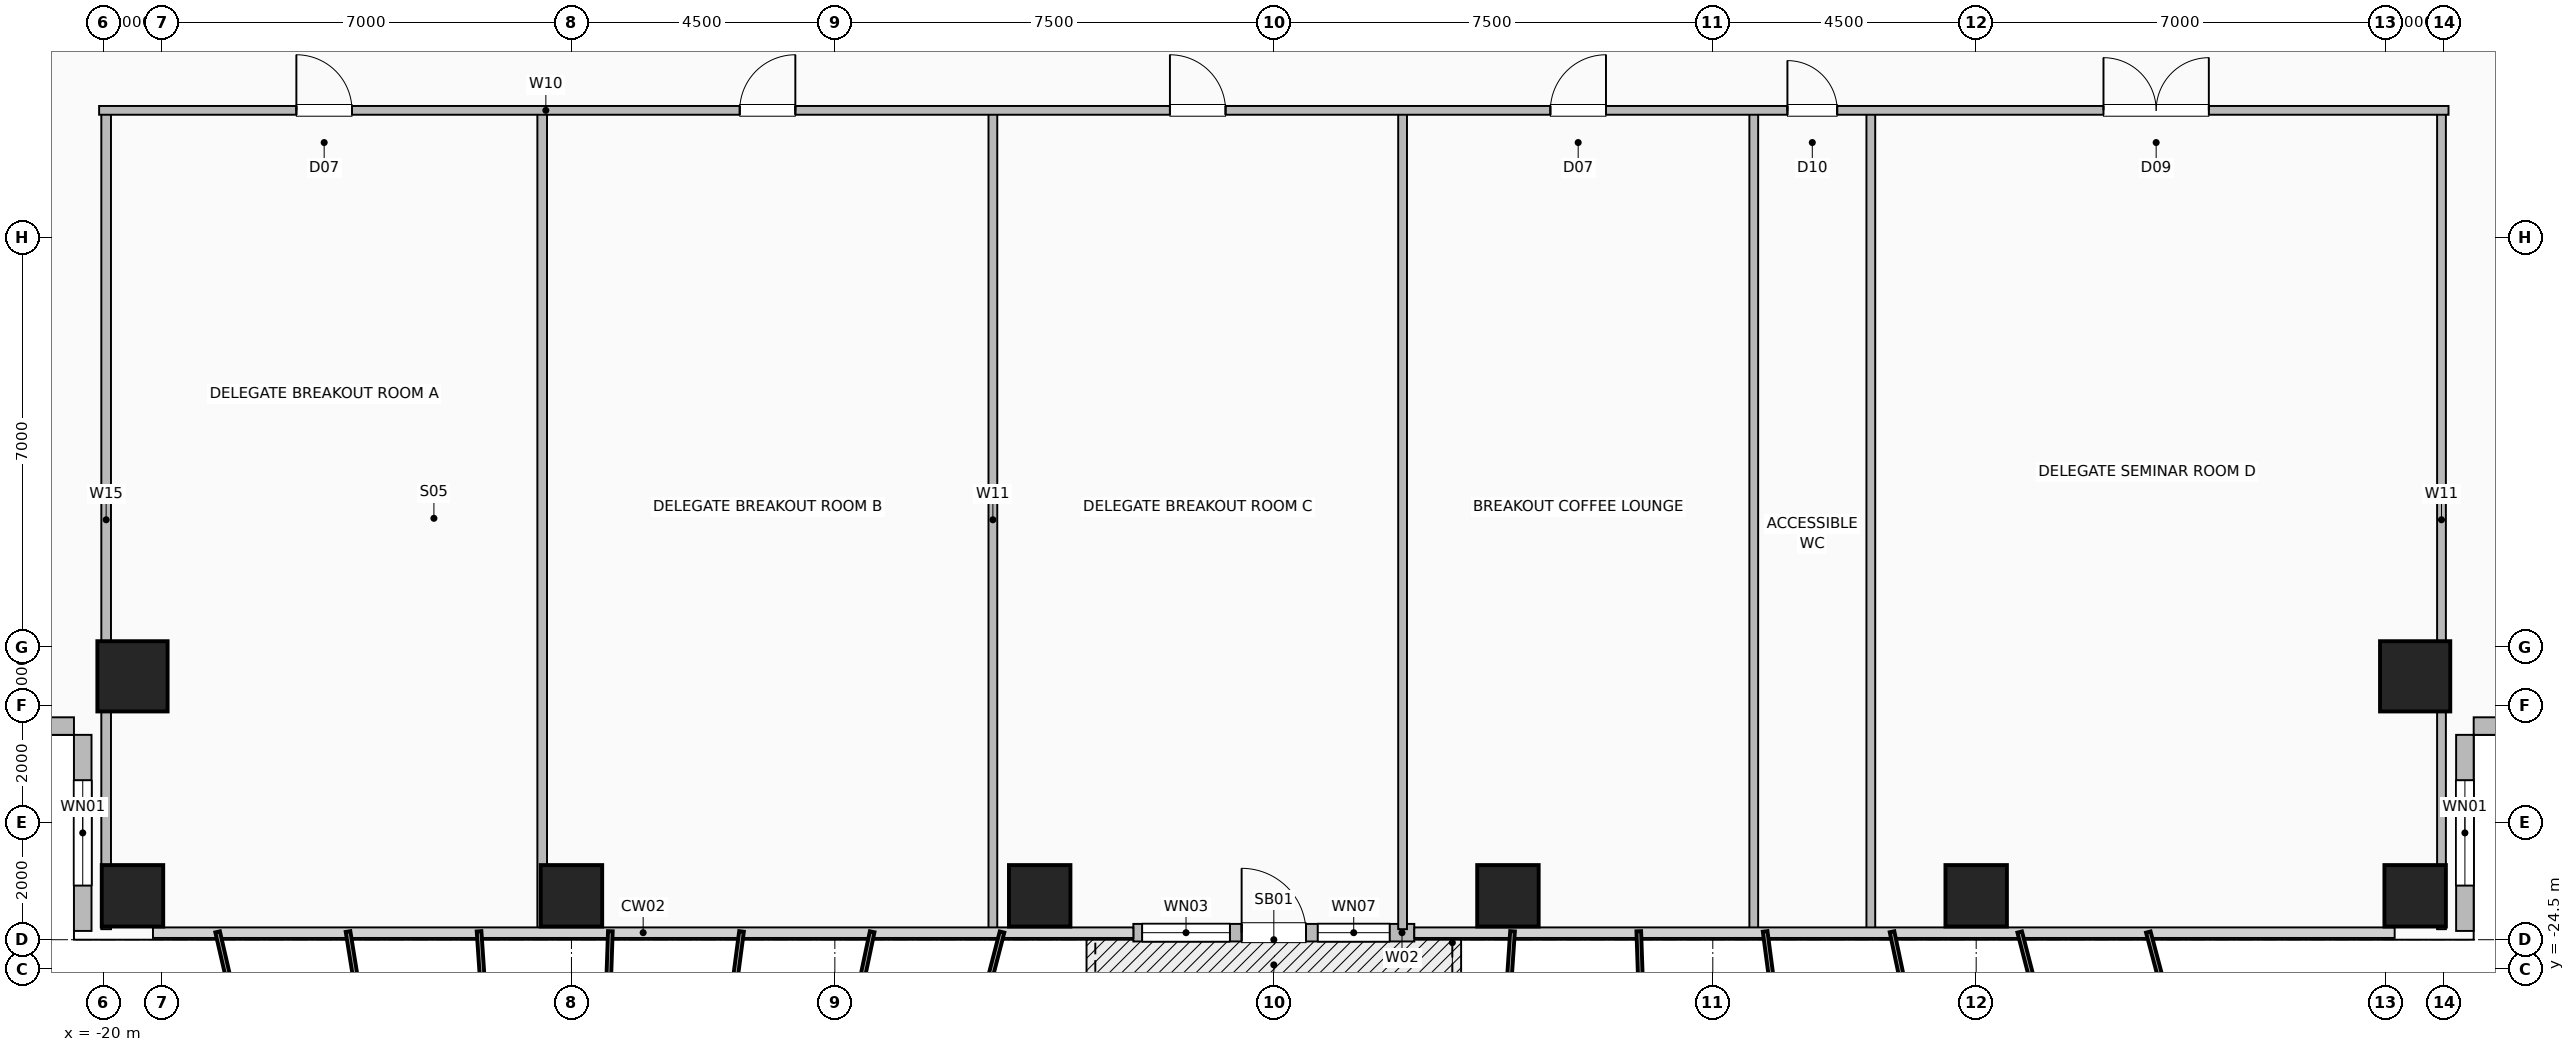
"""IFC4 building model, lengths in metres.
Left out: names, types, materials, properties, quantities, classifications, styles, units other than length and angle.
Written with IfcOpenShell. Run it as: python <this file> out.ifc"""

import sys

from ifc_helpers import new_model, si_unit, direction, frame, frame_2d, origin, origin_2d, place, context, subcontext, project, spatial, rectangle, hollow_rectangle, extrude, element, fill, save


model = new_model("IFC4")
c1 = context("Model", 3, precision=1e-05, world=origin(), true_north=direction((0.0, 1.0)))
c2 = subcontext(c1, "Body", "Model", "MODEL_VIEW")
j1 = project(units=[si_unit("LENGTHUNIT", "METRE"), si_unit("PLANEANGLEUNIT", "RADIAN")], contexts=[c1])
p1 = place(None, origin())
s1 = spatial("IfcSite", under=j1, at=p1, CompositionType="ELEMENT")
p2 = place(p1, origin())
s2 = spatial("IfcBuilding", under=s1, at=p2, CompositionType="ELEMENT")
p3 = place(p2, frame((0.0, 0.0, 37.5)))
s3 = spatial("IfcBuildingStorey", under=s2, at=p3, CompositionType="ELEMENT", Elevation=37.5)
for number, where, z_axis, x_axis in (
    (1, (-19.5, -23.25, 0.0), (0.0, 0.0, 1.0), (1.0, 0.0, 0.0)),
    (2, (-12.0, -23.25, 0.0), (0.0, 0.0, 1.0), (1.0, 0.0, 0.0)),
    (3, (-4.0, -23.25, 0.0), (0.0, 0.0, 1.0), (1.0, 0.0, 0.0)),
    (4, (4.0, -23.25, 0.0), (0.0, 0.0, 1.0), (1.0, 0.0, 0.0)),
    (5, (12.0, -23.25, 0.0), (0.0, 0.0, 1.0), (1.0, 0.0, 0.0)),
    (6, (19.5, -23.25, 0.0), (0.0, 0.0, 1.0), (1.0, 0.0, 0.0)),
):
    element("IfcColumn", number, at=place(p3, frame(where, z_axis=z_axis, x_axis=x_axis)), inside=s3, PredefinedType="COLUMN", context=c2, shape_type="SweptSolid", body=[
        extrude(hollow_rectangle(XDim=1.05, YDim=1.05, WallThickness=0.05, at=origin_2d()), origin(), (0.0, 0.0, 1.0), 3.5),
    ])
for number, where, z_axis, x_axis in (
    (7, (-19.5, -19.5, 0.0), (0.0, 0.0, 1.0), (1.0, 0.0, 0.0)),
    (8, (19.5, -19.5, 0.0), (0.0, 0.0, 1.0), (1.0, 0.0, 0.0)),
):
    element("IfcColumn", number, at=place(p3, frame(where, z_axis=z_axis, x_axis=x_axis)), inside=s3, PredefinedType="COLUMN", context=c2, shape_type="SweptSolid", body=[
        extrude(hollow_rectangle(XDim=1.2, YDim=1.2, WallThickness=0.055, at=origin_2d()), origin(), (0.0, 0.0, 1.0), 3.5),
    ])
p4 = place(p3, frame((-2.4, -23.88, 0.0), z_axis=(0.0, 0.0, 1.0), x_axis=(1.0, 0.0, 0.0)))
e9 = element("IfcWall", 9, at=p4, inside=s3, PredefinedType="SOLIDWALL", context=c2, shape_type="SweptSolid", body=[
    extrude(rectangle(XDim=4.8, YDim=0.3, at=frame_2d((2.4, 0.0))), origin(), (0.0, 0.0, 1.0), 3.25),
])
p5 = place(p4, frame((1.85, 0.0, 0.0)))
e10 = element("IfcOpeningElement", 10, at=p5, cuts=e9, PredefinedType="OPENING", context=c2, shape_type="SweptSolid", body=[
    extrude(rectangle(XDim=1.1, YDim=2.2, at=frame_2d((0.55, 1.1))), frame((0.0, 0.16, 0.0), z_axis=(0.0, -1.0, 0.0), x_axis=(1.0, 0.0, 0.0)), (0.0, 0.0, 1.0), 0.32),
])
p6 = place(p4, frame((0.15, 0.0, 0.85)))
e11 = element("IfcOpeningElement", 11, at=p6, cuts=e9, PredefinedType="OPENING", context=c2, shape_type="SweptSolid", body=[
    extrude(rectangle(XDim=1.5, YDim=1.8, at=frame_2d((0.75, 0.9))), frame((0.0, 0.16, 0.0), z_axis=(0.0, -1.0, 0.0), x_axis=(1.0, 0.0, 0.0)), (0.0, 0.0, 1.0), 0.32),
])
p7 = place(p4, frame((3.15, 0.0, 0.85)))
e12 = element("IfcOpeningElement", 12, at=p7, cuts=e9, PredefinedType="OPENING", context=c2, shape_type="SweptSolid", body=[
    extrude(rectangle(XDim=1.23, YDim=1.8, at=frame_2d((0.615, 0.9))), frame((0.0, 0.16, 0.0), z_axis=(0.0, -1.0, 0.0), x_axis=(1.0, 0.0, 0.0)), (0.0, 0.0, 1.0), 0.32),
])
p8 = place(p3, frame((-20.35, -23.85, 0.0), z_axis=(0.0, 0.0, 1.0), x_axis=(0.0, 1.0, 0.0)))
e13 = element("IfcWall", 13, at=p8, inside=s3, PredefinedType="SOLIDWALL", context=c2, shape_type="SweptSolid", body=[
    extrude(rectangle(XDim=3.35, YDim=0.3, at=frame_2d((1.675, 0.0))), origin(), (0.0, 0.0, 1.0), 3.25),
])
p9 = place(p8, frame((0.775, 0.0, 0.9)))
e14 = element("IfcOpeningElement", 14, at=p9, cuts=e13, PredefinedType="OPENING", context=c2, shape_type="SweptSolid", body=[
    extrude(rectangle(XDim=1.8, YDim=1.8, at=frame_2d((0.9, 0.9))), frame((0.0, 0.16, 0.0), z_axis=(0.0, -1.0, 0.0), x_axis=(1.0, 0.0, 0.0)), (0.0, 0.0, 1.0), 0.32),
])
p10 = place(p3, frame((-23.85, -20.35, 0.0), z_axis=(0.0, 0.0, 1.0), x_axis=(1.0, 0.0, 0.0)))
e15 = element("IfcWall", 15, at=p10, inside=s3, PredefinedType="SOLIDWALL", context=c2, shape_type="SweptSolid", body=[
    extrude(rectangle(XDim=3.35, YDim=0.3, at=frame_2d((1.675, 0.0))), origin(), (0.0, 0.0, 1.0), 3.25),
])
p11 = place(p3, frame((20.35, -23.85, 0.0), z_axis=(0.0, 0.0, 1.0), x_axis=(0.0, 1.0, 0.0)))
e16 = element("IfcWall", 16, at=p11, inside=s3, PredefinedType="SOLIDWALL", context=c2, shape_type="SweptSolid", body=[
    extrude(rectangle(XDim=3.35, YDim=0.3, at=frame_2d((1.675, 0.0))), origin(), (0.0, 0.0, 1.0), 3.25),
])
p12 = place(p11, frame((0.775, 0.0, 0.9)))
e17 = element("IfcOpeningElement", 17, at=p12, cuts=e16, PredefinedType="OPENING", context=c2, shape_type="SweptSolid", body=[
    extrude(rectangle(XDim=1.8, YDim=1.8, at=frame_2d((0.9, 0.9))), frame((0.0, 0.16, 0.0), z_axis=(0.0, -1.0, 0.0), x_axis=(1.0, 0.0, 0.0)), (0.0, 0.0, 1.0), 0.32),
])
p13 = place(p3, frame((23.85, -20.35, 0.0), z_axis=(0.0, 0.0, 1.0), x_axis=(-1.0, 0.0, 0.0)))
e18 = element("IfcWall", 18, at=p13, inside=s3, PredefinedType="SOLIDWALL", context=c2, shape_type="SweptSolid", body=[
    extrude(rectangle(XDim=3.35, YDim=0.3, at=frame_2d((1.675, 0.0))), origin(), (0.0, 0.0, 1.0), 3.25),
])
for number, where, z_axis, x_axis in (
    (19, (-19.95, -23.82, 0.0), (0.0, 0.0, 1.0), (0.0, 1.0, 0.0)),
    (20, (-12.5, -23.82, 0.0), (0.0, 0.0, 1.0), (0.0, 1.0, 0.0)),
):
    element("IfcWall", number, at=place(p3, frame(where, z_axis=z_axis, x_axis=x_axis)), inside=s3, PredefinedType="PLUMBINGWALL", context=c2, shape_type="SweptSolid", body=[
        extrude(rectangle(XDim=13.99, YDim=0.165, at=frame_2d((6.995, 0.0))), origin(), (0.0, 0.0, 1.0), 3.25),
    ])
for number, where, z_axis, x_axis in (
    (21, (-4.8, -23.82, 0.0), (0.0, 0.0, 1.0), (0.0, 1.0, 0.0)),
    (22, (2.2, -23.82, 0.0), (0.0, 0.0, 1.0), (0.0, 1.0, 0.0)),
    (23, (8.2, -23.82, 0.0), (0.0, 0.0, 1.0), (0.0, 1.0, 0.0)),
    (24, (10.2, -23.82, 0.0), (0.0, 0.0, 1.0), (0.0, 1.0, 0.0)),
    (25, (19.95, -23.82, 0.0), (0.0, 0.0, 1.0), (0.0, 1.0, 0.0)),
):
    element("IfcWall", number, at=place(p3, frame(where, z_axis=z_axis, x_axis=x_axis)), inside=s3, PredefinedType="PARTITIONING", context=c2, shape_type="SweptSolid", body=[
        extrude(rectangle(XDim=13.99, YDim=0.15, at=frame_2d((6.995, 0.0))), origin(), (0.0, 0.0, 1.0), 3.25),
    ])
p14 = place(p3, frame((-20.07, -9.83, 0.0), z_axis=(0.0, 0.0, 1.0), x_axis=(1.0, 0.0, 0.0)))
e26 = element("IfcWall", 26, at=p14, inside=s3, PredefinedType="PARTITIONING", context=c2, shape_type="SweptSolid", body=[
    extrude(rectangle(XDim=40.14, YDim=0.15, at=frame_2d((20.07, 0.0))), origin(), (0.0, 0.0, 1.0), 3.25),
])
p15 = place(p14, frame((3.37, 0.0, 0.0)))
e27 = element("IfcOpeningElement", 27, at=p15, cuts=e26, PredefinedType="OPENING", context=c2, shape_type="SweptSolid", body=[
    extrude(rectangle(XDim=0.95, YDim=2.06, at=frame_2d((0.475, 1.03))), frame((0.0, 0.085, 0.0), z_axis=(0.0, -1.0, 0.0), x_axis=(1.0, 0.0, 0.0)), (0.0, 0.0, 1.0), 0.17),
])
p16 = place(p14, frame((10.945, 0.0, 0.0)))
e28 = element("IfcOpeningElement", 28, at=p16, cuts=e26, PredefinedType="OPENING", context=c2, shape_type="SweptSolid", body=[
    extrude(rectangle(XDim=0.95, YDim=2.06, at=frame_2d((0.475, 1.03))), frame((0.0, 0.085, 0.0), z_axis=(0.0, -1.0, 0.0), x_axis=(1.0, 0.0, 0.0)), (0.0, 0.0, 1.0), 0.17),
])
p17 = place(p14, frame((18.295, 0.0, 0.0)))
e29 = element("IfcOpeningElement", 29, at=p17, cuts=e26, PredefinedType="OPENING", context=c2, shape_type="SweptSolid", body=[
    extrude(rectangle(XDim=0.95, YDim=2.06, at=frame_2d((0.475, 1.03))), frame((0.0, 0.085, 0.0), z_axis=(0.0, -1.0, 0.0), x_axis=(1.0, 0.0, 0.0)), (0.0, 0.0, 1.0), 0.17),
])
p18 = place(p14, frame((24.795, 0.0, 0.0)))
e30 = element("IfcOpeningElement", 30, at=p18, cuts=e26, PredefinedType="OPENING", context=c2, shape_type="SweptSolid", body=[
    extrude(rectangle(XDim=0.95, YDim=2.06, at=frame_2d((0.475, 1.03))), frame((0.0, 0.085, 0.0), z_axis=(0.0, -1.0, 0.0), x_axis=(1.0, 0.0, 0.0)), (0.0, 0.0, 1.0), 0.17),
])
p19 = place(p14, frame((28.845, 0.0, 0.0)))
e31 = element("IfcOpeningElement", 31, at=p19, cuts=e26, PredefinedType="OPENING", context=c2, shape_type="SweptSolid", body=[
    extrude(rectangle(XDim=0.85, YDim=2.05, at=frame_2d((0.425, 1.025))), frame((0.0, 0.085, 0.0), z_axis=(0.0, -1.0, 0.0), x_axis=(1.0, 0.0, 0.0)), (0.0, 0.0, 1.0), 0.17),
])
p20 = place(p14, frame((34.245, 0.0, 0.0)))
e32 = element("IfcOpeningElement", 32, at=p20, cuts=e26, PredefinedType="OPENING", context=c2, shape_type="SweptSolid", body=[
    extrude(rectangle(XDim=1.8, YDim=2.08, at=frame_2d((0.9, 1.04))), frame((0.0, 0.085, 0.0), z_axis=(0.0, -1.0, 0.0), x_axis=(1.0, 0.0, 0.0)), (0.0, 0.0, 1.0), 0.17),
])
p21 = place(p5, origin())
e33 = element("IfcDoor", 33, at=p21, inside=s3, OperationType="SINGLE_SWING_LEFT", PredefinedType="DOOR", context=c2, shape_type="SweptSolid", body=[
    extrude(rectangle(XDim=1.1, YDim=2.2, at=frame_2d((0.55, 1.1))), frame((0.0, 0.025, 0.0), z_axis=(0.0, -1.0, 0.0), x_axis=(1.0, 0.0, 0.0)), (0.0, 0.0, 1.0), 0.05),
])
fill(e10, e33)
p22 = place(p6, origin())
e34 = element("IfcWindow", 34, at=p22, inside=s3, PartitioningType="SINGLE_PANEL", PredefinedType="WINDOW", context=c2, shape_type="SweptSolid", body=[
    extrude(rectangle(XDim=1.5, YDim=1.8, at=frame_2d((0.75, 0.9))), frame((0.0, 0.03, 0.0), z_axis=(0.0, -1.0, 0.0), x_axis=(1.0, 0.0, 0.0)), (0.0, 0.0, 1.0), 0.06),
])
fill(e11, e34)
p23 = place(p7, origin())
e35 = element("IfcWindow", 35, at=p23, inside=s3, PartitioningType="SINGLE_PANEL", PredefinedType="WINDOW", context=c2, shape_type="SweptSolid", body=[
    extrude(rectangle(XDim=1.23, YDim=1.8, at=frame_2d((0.615, 0.9))), frame((0.0, 0.03, 0.0), z_axis=(0.0, -1.0, 0.0), x_axis=(1.0, 0.0, 0.0)), (0.0, 0.0, 1.0), 0.06),
])
fill(e12, e35)
p24 = place(p9, origin())
e36 = element("IfcWindow", 36, at=p24, inside=s3, PartitioningType="SINGLE_PANEL", PredefinedType="WINDOW", context=c2, shape_type="SweptSolid", body=[
    extrude(rectangle(XDim=1.8, YDim=1.8, at=frame_2d((0.9, 0.9))), frame((0.0, 0.03, 0.0), z_axis=(0.0, -1.0, 0.0), x_axis=(1.0, 0.0, 0.0)), (0.0, 0.0, 1.0), 0.06),
])
fill(e14, e36)
p25 = place(p12, origin())
e37 = element("IfcWindow", 37, at=p25, inside=s3, PartitioningType="SINGLE_PANEL", PredefinedType="WINDOW", context=c2, shape_type="SweptSolid", body=[
    extrude(rectangle(XDim=1.8, YDim=1.8, at=frame_2d((0.9, 0.9))), frame((0.0, 0.03, 0.0), z_axis=(0.0, -1.0, 0.0), x_axis=(1.0, 0.0, 0.0)), (0.0, 0.0, 1.0), 0.06),
])
fill(e17, e37)
p26 = place(p15, origin())
e38 = element("IfcDoor", 38, at=p26, inside=s3, OperationType="SINGLE_SWING_LEFT", PredefinedType="DOOR", context=c2, shape_type="SweptSolid", body=[
    extrude(rectangle(XDim=0.95, YDim=2.06, at=frame_2d((0.475, 1.03))), frame((0.0, 0.025, 0.0), z_axis=(0.0, -1.0, 0.0), x_axis=(1.0, 0.0, 0.0)), (0.0, 0.0, 1.0), 0.05),
])
fill(e27, e38)
p27 = place(p16, origin())
e39 = element("IfcDoor", 39, at=p27, inside=s3, OperationType="SINGLE_SWING_RIGHT", PredefinedType="DOOR", context=c2, shape_type="SweptSolid", body=[
    extrude(rectangle(XDim=0.95, YDim=2.06, at=frame_2d((0.475, 1.03))), frame((0.0, 0.025, 0.0), z_axis=(0.0, -1.0, 0.0), x_axis=(1.0, 0.0, 0.0)), (0.0, 0.0, 1.0), 0.05),
])
fill(e28, e39)
p28 = place(p17, origin())
e40 = element("IfcDoor", 40, at=p28, inside=s3, OperationType="SINGLE_SWING_LEFT", PredefinedType="DOOR", context=c2, shape_type="SweptSolid", body=[
    extrude(rectangle(XDim=0.95, YDim=2.06, at=frame_2d((0.475, 1.03))), frame((0.0, 0.025, 0.0), z_axis=(0.0, -1.0, 0.0), x_axis=(1.0, 0.0, 0.0)), (0.0, 0.0, 1.0), 0.05),
])
fill(e29, e40)
p29 = place(p18, origin())
e41 = element("IfcDoor", 41, at=p29, inside=s3, OperationType="SINGLE_SWING_RIGHT", PredefinedType="DOOR", context=c2, shape_type="SweptSolid", body=[
    extrude(rectangle(XDim=0.95, YDim=2.06, at=frame_2d((0.475, 1.03))), frame((0.0, 0.025, 0.0), z_axis=(0.0, -1.0, 0.0), x_axis=(1.0, 0.0, 0.0)), (0.0, 0.0, 1.0), 0.05),
])
fill(e30, e41)
p30 = place(p19, origin())
e42 = element("IfcDoor", 42, at=p30, inside=s3, OperationType="SINGLE_SWING_LEFT", PredefinedType="DOOR", context=c2, shape_type="SweptSolid", body=[
    extrude(rectangle(XDim=0.85, YDim=2.05, at=frame_2d((0.425, 1.025))), frame((0.0, 0.025, 0.0), z_axis=(0.0, -1.0, 0.0), x_axis=(1.0, 0.0, 0.0)), (0.0, 0.0, 1.0), 0.05),
])
fill(e31, e42)
p31 = place(p20, origin())
e43 = element("IfcDoor", 43, at=p31, inside=s3, OperationType="DOUBLE_DOOR_SINGLE_SWING", PredefinedType="DOOR", context=c2, shape_type="SweptSolid", body=[
    extrude(rectangle(XDim=1.8, YDim=2.08, at=frame_2d((0.9, 1.04))), frame((0.0, 0.025, 0.0), z_axis=(0.0, -1.0, 0.0), x_axis=(1.0, 0.0, 0.0)), (0.0, 0.0, 1.0), 0.05),
])
fill(e32, e43)
save(model, sys.argv[1])
